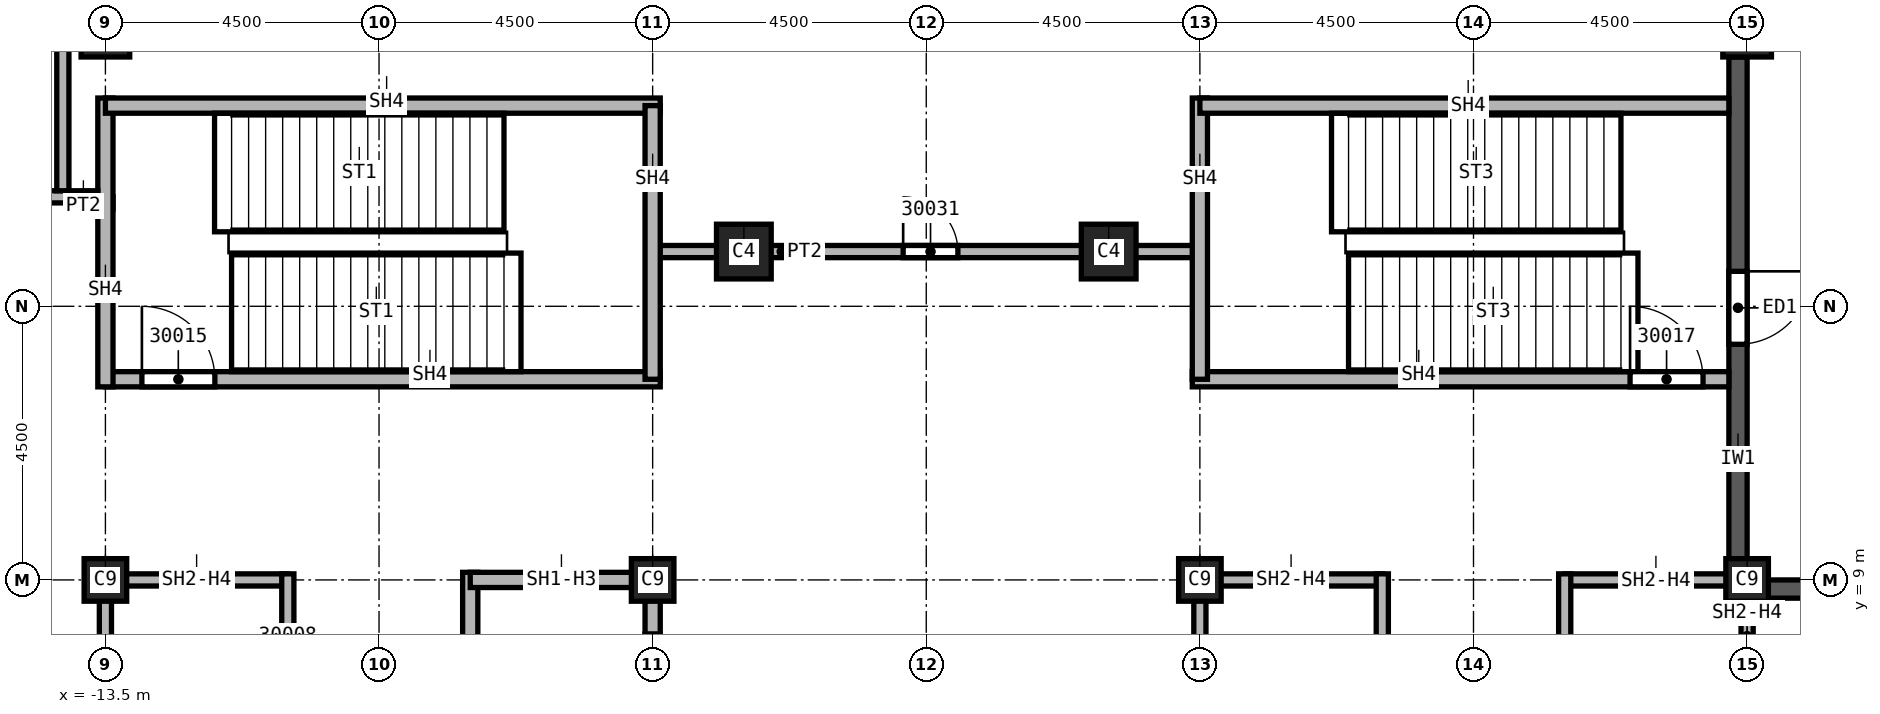
"""IFC4 building model, lengths in metres.
Left out: names, types, materials, properties, quantities, classifications, styles, units other than length and angle.
Written with IfcOpenShell. Run it as: python <this file> out.ifc"""

import sys

from ifc_helpers import new_model, si_unit, direction, frame, frame_2d, origin, origin_2d, place, context, subcontext, project, spatial, rectangle, extrude, element, fill, save


model = new_model("IFC4")
c1 = context("Model", 3, precision=1e-05, world=origin(), true_north=direction((0.0, 1.0)))
c2 = subcontext(c1, "Body", "Model", "MODEL_VIEW")
j1 = project(units=[si_unit("LENGTHUNIT", "METRE"), si_unit("PLANEANGLEUNIT", "RADIAN")], contexts=[c1])
p1 = place(None, origin())
s1 = spatial("IfcSite", under=j1, at=p1, CompositionType="ELEMENT")
p2 = place(p1, origin())
s2 = spatial("IfcBuilding", under=s1, at=p2, CompositionType="ELEMENT")
p3 = place(p2, frame((0.0, 0.0, 320.0)))
s3 = spatial("IfcBuildingStorey", under=s2, at=p3, CompositionType="ELEMENT", Elevation=320.0)
for number, where, z_axis, x_axis in (
    (1, (13.5, 18.0, 0.0), (0.0, 0.0, 1.0), (1.0, 0.0, 0.0)),
    (2, (-13.5, 18.0, 0.0), (0.0, 0.0, 1.0), (1.0, 0.0, 0.0)),
):
    element("IfcColumn", number, at=place(p3, frame(where, z_axis=z_axis, x_axis=x_axis)), inside=s3, PredefinedType="COLUMN", context=c2, shape_type="SweptSolid", body=[
        extrude(rectangle(XDim=0.8, YDim=0.8, at=origin_2d()), origin(), (0.0, 0.0, 1.0), 5.74),
    ])
for number, where, z_axis, x_axis in (
    (3, (4.5, 9.0, 0.0), (0.0, 0.0, 1.0), (1.0, 0.0, 0.0)),
    (4, (13.5, 9.0, 0.0), (0.0, 0.0, 1.0), (1.0, 0.0, 0.0)),
    (5, (-4.5, 9.0, 0.0), (0.0, 0.0, 1.0), (1.0, 0.0, 0.0)),
    (6, (-13.5, 9.0, 0.0), (0.0, 0.0, 1.0), (1.0, 0.0, 0.0)),
):
    element("IfcColumn", number, at=place(p3, frame(where, z_axis=z_axis, x_axis=x_axis)), inside=s3, PredefinedType="COLUMN", context=c2, shape_type="SweptSolid", body=[
        extrude(rectangle(XDim=0.7, YDim=0.7, at=origin_2d()), origin(), (0.0, 0.0, 1.0), 5.74),
    ])
for number, where, z_axis, x_axis in (
    (7, (3.0, 14.4, 0.0), (0.0, 0.329, 0.944), (-1.0, 0.0, 0.0)),
    (8, (-3.0, 14.4, 0.0), (0.0, 0.329, 0.944), (-1.0, 0.0, 0.0)),
):
    element("IfcColumn", number, at=place(p3, frame(where, z_axis=z_axis, x_axis=x_axis)), inside=s3, PredefinedType="COLUMN", context=c2, shape_type="SweptSolid", body=[
        extrude(rectangle(XDim=0.9, YDim=0.9, at=origin_2d()), origin(), (0.0, 0.0, 1.0), 6.078),
    ])
p4 = place(p3, frame((13.35, 17.6, 0.0), z_axis=(0.0, 0.0, 1.0), x_axis=(0.0, -1.0, 0.0)))
e9 = element("IfcWall", 9, at=p4, inside=s3, PredefinedType="SOLIDWALL", context=c2, shape_type="SweptSolid", body=[
    extrude(rectangle(XDim=8.55, YDim=0.3, at=frame_2d((4.275, 0.0))), origin(), (0.0, 0.0, 1.0), 5.14),
])
p5 = place(p4, frame((3.525, 0.0, 0.0)))
e10 = element("IfcOpeningElement", 10, at=p5, cuts=e9, PredefinedType="OPENING", context=c2, shape_type="SweptSolid", body=[
    extrude(rectangle(XDim=1.2, YDim=2.4, at=frame_2d((0.6, 1.2))), frame((0.0, 0.15, 0.0), z_axis=(0.0, -1.0, 0.0), x_axis=(1.0, 0.0, 0.0)), (0.0, 0.0, 1.0), 0.3),
])
p6 = place(p3, frame((22.1, 8.85, 0.0), z_axis=(0.0, 0.0, 1.0), x_axis=(-1.0, 0.0, 0.0)))
e11 = element("IfcWall", 11, at=p6, inside=s3, PredefinedType="SOLIDWALL", context=c2, shape_type="SweptSolid", body=[
    extrude(rectangle(XDim=8.55, YDim=0.3, at=frame_2d((4.275, 0.0))), origin(), (0.0, 0.0, 1.0), 5.14),
])
p7 = place(p3, frame((-14.1, 15.2, 0.0), z_axis=(0.0, 0.0, 1.0), x_axis=(1.0, 0.0, 0.0)))
e12 = element("IfcWall", 12, at=p7, inside=s3, PredefinedType="PARTITIONING", context=c2, shape_type="SweptSolid", body=[
    extrude(rectangle(XDim=0.725, YDim=0.2, at=frame_2d((0.363, 0.0))), origin(), (0.0, 0.0, 1.0), 5.74),
])
p8 = place(p3, frame((-4.5, 14.4, 0.0), z_axis=(0.0, 0.0, 1.0), x_axis=(1.0, 0.0, 0.0)))
e13 = element("IfcWall", 13, at=p8, inside=s3, PredefinedType="PARTITIONING", context=c2, shape_type="SweptSolid", body=[
    extrude(rectangle(XDim=9.0, YDim=0.2, at=frame_2d((4.5, 0.0))), origin(), (0.0, 0.0, 1.0), 5.74),
])
p9 = place(p8, frame((4.12, 0.0, 0.0)))
e14 = element("IfcOpeningElement", 14, at=p9, cuts=e13, PredefinedType="OPENING", context=c2, shape_type="SweptSolid", body=[
    extrude(rectangle(XDim=0.9, YDim=2.1, at=frame_2d((0.45, 1.05))), frame((0.0, 0.1, 0.0), z_axis=(0.0, -1.0, 0.0), x_axis=(1.0, 0.0, 0.0)), (0.0, 0.0, 1.0), 0.2),
])
p10 = place(p3, frame((-13.5, 5.0, 0.0), z_axis=(0.0, 0.0, 1.0), x_axis=(0.0, 1.0, 0.0)))
e15 = element("IfcWall", 15, at=p10, inside=s3, PredefinedType="SOLIDWALL", context=c2, shape_type="SweptSolid", body=[
    extrude(rectangle(XDim=4.1, YDim=0.2, at=frame_2d((2.05, 0.0))), origin(), (0.0, 0.0, 1.0), 5.062),
])
p11 = place(p3, frame((-13.5, 9.0, 0.0), z_axis=(0.0, 0.0, 1.0), x_axis=(1.0, 0.0, 0.0)))
e16 = element("IfcWall", 16, at=p11, inside=s3, PredefinedType="SOLIDWALL", context=c2, shape_type="SweptSolid", body=[
    extrude(rectangle(XDim=3.0, YDim=0.2, at=frame_2d((1.5, 0.0))), origin(), (0.0, 0.0, 1.0), 5.062),
])
p12 = place(p3, frame((-10.5, 4.925, 0.0), z_axis=(0.0, 0.0, 1.0), x_axis=(0.0, 1.0, 0.0)))
e17 = element("IfcWall", 17, at=p12, inside=s3, PredefinedType="SOLIDWALL", context=c2, shape_type="SweptSolid", body=[
    extrude(rectangle(XDim=4.175, YDim=0.2, at=frame_2d((2.087, 0.0))), origin(), (0.0, 0.0, 1.0), 5.74),
])
p13 = place(p12, frame((1.6, 0.0, 0.0)))
e18 = element("IfcOpeningElement", 18, at=p13, cuts=e17, PredefinedType="OPENING", context=c2, shape_type="SweptSolid", body=[
    extrude(rectangle(XDim=1.1, YDim=2.1, at=frame_2d((0.55, 1.05))), frame((0.0, 0.1, 0.0), z_axis=(0.0, -1.0, 0.0), x_axis=(1.0, 0.0, 0.0)), (0.0, 0.0, 1.0), 0.2),
])
p14 = place(p3, frame((4.5, -6.0, 0.0), z_axis=(0.0, 0.0, 1.0), x_axis=(0.0, 1.0, 0.0)))
e19 = element("IfcWall", 19, at=p14, inside=s3, PredefinedType="SOLIDWALL", context=c2, shape_type="SweptSolid", body=[
    extrude(rectangle(XDim=15.1, YDim=0.2, at=frame_2d((7.55, 0.0))), origin(), (0.0, 0.0, 1.0), 5.062),
])
p15 = place(p14, frame((3.7, 0.0, 0.0)))
e20 = element("IfcOpeningElement", 20, at=p15, cuts=e19, PredefinedType="OPENING", context=c2, shape_type="SweptSolid", body=[
    extrude(rectangle(XDim=1.1, YDim=2.1, at=frame_2d((0.55, 1.05))), frame((0.0, 0.1, 0.0), z_axis=(0.0, -1.0, 0.0), x_axis=(1.0, 0.0, 0.0)), (0.0, 0.0, 1.0), 0.2),
])
p16 = place(p14, frame((12.25, 0.0, 0.0)))
e21 = element("IfcOpeningElement", 21, at=p16, cuts=e19, PredefinedType="OPENING", context=c2, shape_type="SweptSolid", body=[
    extrude(rectangle(XDim=1.1, YDim=2.1, at=frame_2d((0.55, 1.05))), frame((0.0, 0.1, 0.0), z_axis=(0.0, -1.0, 0.0), x_axis=(1.0, 0.0, 0.0)), (0.0, 0.0, 1.0), 0.2),
])
p17 = place(p3, frame((4.5, 9.0, 0.0), z_axis=(0.0, 0.0, 1.0), x_axis=(1.0, 0.0, 0.0)))
e22 = element("IfcWall", 22, at=p17, inside=s3, PredefinedType="SOLIDWALL", context=c2, shape_type="SweptSolid", body=[
    extrude(rectangle(XDim=3.0, YDim=0.2, at=frame_2d((1.5, 0.0))), origin(), (0.0, 0.0, 1.0), 5.062),
])
p18 = place(p3, frame((7.5, 9.1, 0.0), z_axis=(0.0, 0.0, 1.0), x_axis=(0.0, -1.0, 0.0)))
e23 = element("IfcWall", 23, at=p18, inside=s3, PredefinedType="SOLIDWALL", context=c2, shape_type="SweptSolid", body=[
    extrude(rectangle(XDim=6.225, YDim=0.2, at=frame_2d((3.113, 0.0))), origin(), (0.0, 0.0, 1.0), 5.74),
])
p19 = place(p3, frame((10.5, 9.0, 0.0), z_axis=(0.0, 0.0, 1.0), x_axis=(1.0, 0.0, 0.0)))
e24 = element("IfcWall", 24, at=p19, inside=s3, PredefinedType="SOLIDWALL", context=c2, shape_type="SweptSolid", body=[
    extrude(rectangle(XDim=3.0, YDim=0.2, at=frame_2d((1.5, 0.0))), origin(), (0.0, 0.0, 1.0), 5.062),
])
p20 = place(p3, frame((10.5, 9.1, 0.0), z_axis=(0.0, 0.0, 1.0), x_axis=(0.0, -1.0, 0.0)))
e25 = element("IfcWall", 25, at=p20, inside=s3, PredefinedType="SOLIDWALL", context=c2, shape_type="SweptSolid", body=[
    extrude(rectangle(XDim=3.225, YDim=0.2, at=frame_2d((1.613, 0.0))), origin(), (0.0, 0.0, 1.0), 5.74),
])
p21 = place(p3, frame((13.5, 9.05, 0.0), z_axis=(0.0, 0.0, 1.0), x_axis=(0.0, -1.0, 0.0)))
e26 = element("IfcWall", 26, at=p21, inside=s3, PredefinedType="SOLIDWALL", context=c2, shape_type="SweptSolid", body=[
    extrude(rectangle(XDim=3.05, YDim=0.2, at=frame_2d((1.525, 0.0))), origin(), (0.0, 0.0, 1.0), 5.062),
])
p22 = place(p21, frame((1.6, 0.0, 0.0)))
e27 = element("IfcOpeningElement", 27, at=p22, cuts=e26, PredefinedType="OPENING", context=c2, shape_type="SweptSolid", body=[
    extrude(rectangle(XDim=1.1, YDim=2.1, at=frame_2d((0.55, 1.05))), frame((0.0, 0.1, 0.0), z_axis=(0.0, -1.0, 0.0), x_axis=(1.0, 0.0, 0.0)), (0.0, 0.0, 1.0), 0.2),
])
p23 = place(p3, frame((-7.5, 6.0, 0.0), z_axis=(0.0, 0.0, 1.0), x_axis=(0.0, 1.0, 0.0)))
e28 = element("IfcWall", 28, at=p23, inside=s3, PredefinedType="SOLIDWALL", context=c2, shape_type="SweptSolid", body=[
    extrude(rectangle(XDim=3.125, YDim=0.25, at=frame_2d((1.562, 0.0))), origin(), (0.0, 0.0, 1.0), 5.74),
])
p24 = place(p3, frame((-7.5, 9.0, 0.0), z_axis=(0.0, 0.0, 1.0), x_axis=(1.0, 0.0, 0.0)))
e29 = element("IfcWall", 29, at=p24, inside=s3, PredefinedType="SOLIDWALL", context=c2, shape_type="SweptSolid", body=[
    extrude(rectangle(XDim=3.0, YDim=0.25, at=frame_2d((1.5, 0.0))), origin(), (0.0, 0.0, 1.0), 5.062),
])
p25 = place(p3, frame((-4.5, 9.125, 0.0), z_axis=(0.0, 0.0, 1.0), x_axis=(0.0, -1.0, 0.0)))
e30 = element("IfcWall", 30, at=p25, inside=s3, PredefinedType="SOLIDWALL", context=c2, shape_type="SweptSolid", body=[
    extrude(rectangle(XDim=3.125, YDim=0.25, at=frame_2d((1.562, 0.0))), origin(), (0.0, 0.0, 1.0), 5.062),
])
p26 = place(p25, frame((1.012, 0.0, 0.0)))
e31 = element("IfcOpeningElement", 31, at=p26, cuts=e30, PredefinedType="OPENING", context=c2, shape_type="SweptSolid", body=[
    extrude(rectangle(XDim=1.1, YDim=2.1, at=frame_2d((0.55, 1.05))), frame((0.0, 0.125, 0.0), z_axis=(0.0, -1.0, 0.0), x_axis=(1.0, 0.0, 0.0)), (0.0, 0.0, 1.0), 0.25),
])
p27 = place(p3, frame((-13.5, 12.3, 0.0), z_axis=(0.0, 0.0, 1.0), x_axis=(1.0, 0.0, 0.0)))
e32 = element("IfcWall", 32, at=p27, inside=s3, PredefinedType="SOLIDWALL", context=c2, shape_type="SweptSolid", body=[
    extrude(rectangle(XDim=9.125, YDim=0.25, at=frame_2d((4.562, 0.0))), origin(), (0.0, 0.0, 1.0), 5.74),
])
p28 = place(p27, frame((0.6, 0.0, 0.0)))
e33 = element("IfcOpeningElement", 33, at=p28, cuts=e32, PredefinedType="OPENING", context=c2, shape_type="SweptSolid", body=[
    extrude(rectangle(XDim=1.2, YDim=2.1, at=frame_2d((0.6, 1.05))), frame((0.0, 0.125, 0.0), z_axis=(0.0, -1.0, 0.0), x_axis=(1.0, 0.0, 0.0)), (0.0, 0.0, 1.0), 0.25),
])
p29 = place(p3, frame((-13.5, 12.175, 0.0), z_axis=(0.0, 0.0, 1.0), x_axis=(0.0, 1.0, 0.0)))
e34 = element("IfcWall", 34, at=p29, inside=s3, PredefinedType="SOLIDWALL", context=c2, shape_type="SweptSolid", body=[
    extrude(rectangle(XDim=4.75, YDim=0.25, at=frame_2d((2.375, 0.0))), origin(), (0.0, 0.0, 1.0), 5.74),
])
p30 = place(p3, frame((-13.5, 16.8, 0.0), z_axis=(0.0, 0.0, 1.0), x_axis=(1.0, 0.0, 0.0)))
e35 = element("IfcWall", 35, at=p30, inside=s3, PredefinedType="SOLIDWALL", context=c2, shape_type="SweptSolid", body=[
    extrude(rectangle(XDim=9.125, YDim=0.25, at=frame_2d((4.562, 0.0))), origin(), (0.0, 0.0, 1.0), 5.74),
])
p31 = place(p3, frame((-4.5, 16.8, 0.0), z_axis=(0.0, 0.0, 1.0), x_axis=(0.0, -1.0, 0.0)))
e36 = element("IfcWall", 36, at=p31, inside=s3, PredefinedType="SOLIDWALL", context=c2, shape_type="SweptSolid", body=[
    extrude(rectangle(XDim=4.5, YDim=0.25, at=frame_2d((2.25, 0.0))), origin(), (0.0, 0.0, 1.0), 5.74),
])
p32 = place(p3, frame((4.375, 12.3, 0.0), z_axis=(0.0, 0.0, 1.0), x_axis=(1.0, 0.0, 0.0)))
e37 = element("IfcWall", 37, at=p32, inside=s3, PredefinedType="SOLIDWALL", context=c2, shape_type="SweptSolid", body=[
    extrude(rectangle(XDim=8.825, YDim=0.25, at=frame_2d((4.413, 0.0))), origin(), (0.0, 0.0, 1.0), 5.74),
])
p33 = place(p32, frame((7.2, 0.0, 0.0)))
e38 = element("IfcOpeningElement", 38, at=p33, cuts=e37, PredefinedType="OPENING", context=c2, shape_type="SweptSolid", body=[
    extrude(rectangle(XDim=1.2, YDim=2.1, at=frame_2d((0.6, 1.05))), frame((0.0, 0.125, 0.0), z_axis=(0.0, -1.0, 0.0), x_axis=(1.0, 0.0, 0.0)), (0.0, 0.0, 1.0), 0.25),
])
p34 = place(p3, frame((4.5, 12.3, 0.0), z_axis=(0.0, 0.0, 1.0), x_axis=(0.0, 1.0, 0.0)))
e39 = element("IfcWall", 39, at=p34, inside=s3, PredefinedType="SOLIDWALL", context=c2, shape_type="SweptSolid", body=[
    extrude(rectangle(XDim=4.625, YDim=0.25, at=frame_2d((2.312, 0.0))), origin(), (0.0, 0.0, 1.0), 5.74),
])
p35 = place(p3, frame((4.5, 16.8, 0.0), z_axis=(0.0, 0.0, 1.0), x_axis=(1.0, 0.0, 0.0)))
e40 = element("IfcWall", 40, at=p35, inside=s3, PredefinedType="SOLIDWALL", context=c2, shape_type="SweptSolid", body=[
    extrude(rectangle(XDim=8.7, YDim=0.25, at=frame_2d((4.35, 0.0))), origin(), (0.0, 0.0, 1.0), 5.74),
])
p36 = place(p3, frame((-21.9, 15.3, 0.0), z_axis=(0.0, 0.0, 1.0), x_axis=(1.0, 0.0, 0.0)))
e41 = element("IfcWall", 41, at=p36, inside=s3, PredefinedType="SOLIDWALL", context=c2, shape_type="SweptSolid", body=[
    extrude(rectangle(XDim=8.275, YDim=0.2, at=frame_2d((4.137, 0.0))), origin(), (0.0, 0.0, 1.0), 5.74),
])
p37 = place(p36, frame((4.8, 0.0, 0.0)))
e42 = element("IfcOpeningElement", 42, at=p37, cuts=e41, PredefinedType="OPENING", context=c2, shape_type="SweptSolid", body=[
    extrude(rectangle(XDim=1.2, YDim=2.1, at=frame_2d((0.6, 1.05))), frame((0.0, 0.1, 0.0), z_axis=(0.0, -1.0, 0.0), x_axis=(1.0, 0.0, 0.0)), (0.0, 0.0, 1.0), 0.2),
])
p38 = place(p3, frame((-14.2, 15.4, 0.0), z_axis=(0.0, 0.0, 1.0), x_axis=(0.0, 1.0, 0.0)))
e43 = element("IfcWall", 43, at=p38, inside=s3, PredefinedType="SOLIDWALL", context=c2, shape_type="SweptSolid", body=[
    extrude(rectangle(XDim=5.9, YDim=0.2, at=frame_2d((2.95, 0.0))), origin(), (0.0, 0.0, 1.0), 5.74),
])
p39 = place(p5, origin())
e44 = element("IfcDoor", 44, at=p39, inside=s3, OperationType="SINGLE_SWING_LEFT", PredefinedType="DOOR", context=c2, shape_type="SweptSolid", body=[
    extrude(rectangle(XDim=1.2, YDim=2.4, at=frame_2d((0.6, 1.2))), frame((0.0, 0.025, 0.0), z_axis=(0.0, -1.0, 0.0), x_axis=(1.0, 0.0, 0.0)), (0.0, 0.0, 1.0), 0.05),
])
fill(e10, e44)
p40 = place(p28, origin())
e45 = element("IfcDoor", 45, at=p40, inside=s3, OperationType="SINGLE_SWING_RIGHT", PredefinedType="DOOR", context=c2, shape_type="SweptSolid", body=[
    extrude(rectangle(XDim=1.2, YDim=2.1, at=frame_2d((0.6, 1.05))), frame((0.0, 0.025, 0.0), z_axis=(0.0, -1.0, 0.0), x_axis=(1.0, 0.0, 0.0)), (0.0, 0.0, 1.0), 0.05),
])
fill(e33, e45)
p41 = place(p33, origin())
e46 = element("IfcDoor", 46, at=p41, inside=s3, OperationType="SINGLE_SWING_RIGHT", PredefinedType="DOOR", context=c2, shape_type="SweptSolid", body=[
    extrude(rectangle(XDim=1.2, YDim=2.1, at=frame_2d((0.6, 1.05))), frame((0.0, 0.025, 0.0), z_axis=(0.0, -1.0, 0.0), x_axis=(1.0, 0.0, 0.0)), (0.0, 0.0, 1.0), 0.05),
])
fill(e38, e46)
p42 = place(p9, origin())
e47 = element("IfcDoor", 47, at=p42, inside=s3, OperationType="SINGLE_SWING_LEFT", PredefinedType="DOOR", context=c2, shape_type="SweptSolid", body=[
    extrude(rectangle(XDim=0.9, YDim=2.1, at=frame_2d((0.45, 1.05))), frame((0.0, 0.025, 0.0), z_axis=(0.0, -1.0, 0.0), x_axis=(1.0, 0.0, 0.0)), (0.0, 0.0, 1.0), 0.05),
])
fill(e14, e47)
p43 = place(p26, origin())
e48 = element("IfcDoor", 48, at=p43, inside=s3, OperationType="SLIDING_TO_LEFT", PredefinedType="DOOR", context=c2, shape_type="SweptSolid", body=[
    extrude(rectangle(XDim=1.1, YDim=2.1, at=frame_2d((0.55, 1.05))), frame((0.0, 0.025, 0.0), z_axis=(0.0, -1.0, 0.0), x_axis=(1.0, 0.0, 0.0)), (0.0, 0.0, 1.0), 0.05),
])
fill(e31, e48)
save(model, sys.argv[1])
